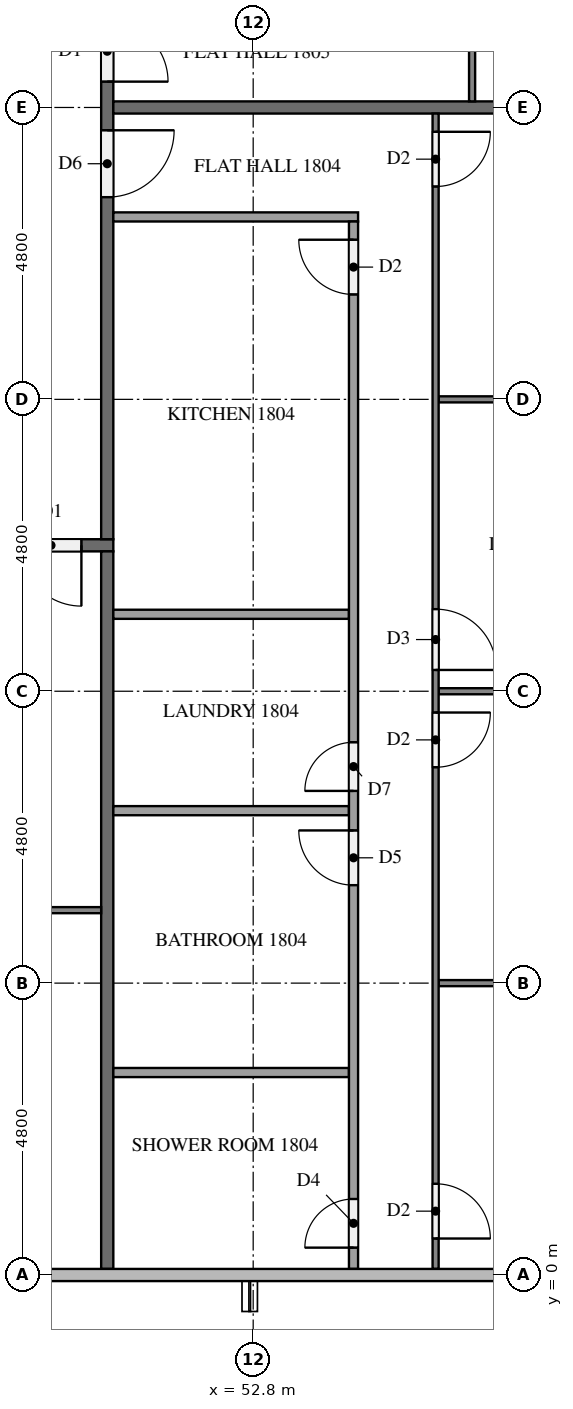
"""IFC4 building model, lengths in metres.
Left out: names, types, materials, properties, quantities, classifications, styles, units other than length and angle.
Written with IfcOpenShell. Run it as: python <this file> out.ifc"""

import sys

from ifc_helpers import new_model, si_unit, direction, frame, frame_2d, origin, place, context, subcontext, project, spatial, rectangle, extrude, element, fill, save


model = new_model("IFC4")
c1 = context("Model", 3, precision=1e-05, world=origin(), true_north=direction((0.0, 1.0)))
c2 = subcontext(c1, "Body", "Model", "MODEL_VIEW")
j1 = project(units=[si_unit("LENGTHUNIT", "METRE"), si_unit("PLANEANGLEUNIT", "RADIAN")], contexts=[c1])
p1 = place(None, origin())
s1 = spatial("IfcSite", under=j1, at=p1, CompositionType="ELEMENT")
p2 = place(p1, origin())
s2 = spatial("IfcBuilding", under=s1, at=p2, CompositionType="ELEMENT")
p3 = place(p2, frame((0.0, 0.0, 73.3)))
s3 = spatial("IfcBuildingStorey", under=s2, at=p3, CompositionType="ELEMENT", Elevation=73.3)
p4 = place(p3, frame((50.5, 12.0, 0.0), z_axis=(0.0, 0.0, 1.0), x_axis=(-1.0, 0.0, 0.0)))
e1 = element("IfcWall", 1, at=p4, inside=s3, PredefinedType="PARTITIONING", context=c2, shape_type="SweptSolid", body=[
    extrude(rectangle(XDim=38.6, YDim=0.2, at=frame_2d((19.3, 0.0))), origin(), (0.0, 0.0, 1.0), 3.2),
])
p5 = place(p4, frame((37.075, 0.0, 0.0)))
e2 = element("IfcOpeningElement", 2, at=p5, cuts=e1, PredefinedType="OPENING", context=c2, shape_type="SweptSolid", body=[
    extrude(rectangle(XDim=1.0, YDim=2.1, at=frame_2d((0.5, 1.05))), frame((0.0, 0.11, 0.0), z_axis=(0.0, -1.0, 0.0), x_axis=(1.0, 0.0, 0.0)), (0.0, 0.0, 1.0), 0.22),
])
p6 = place(p4, frame((22.675, 0.0, 0.0)))
e3 = element("IfcOpeningElement", 3, at=p6, cuts=e1, PredefinedType="OPENING", context=c2, shape_type="SweptSolid", body=[
    extrude(rectangle(XDim=1.0, YDim=2.1, at=frame_2d((0.5, 1.05))), frame((0.0, 0.11, 0.0), z_axis=(0.0, -1.0, 0.0), x_axis=(1.0, 0.0, 0.0)), (0.0, 0.0, 1.0), 0.22),
])
p7 = place(p4, frame((0.525, 0.0, 0.0)))
e4 = element("IfcOpeningElement", 4, at=p7, cuts=e1, PredefinedType="OPENING", context=c2, shape_type="SweptSolid", body=[
    extrude(rectangle(XDim=1.0, YDim=2.1, at=frame_2d((0.5, 1.05))), frame((0.0, 0.11, 0.0), z_axis=(0.0, -1.0, 0.0), x_axis=(1.0, 0.0, 0.0)), (0.0, 0.0, 1.0), 0.22),
])
p8 = place(p3, frame((50.4, 40.7, 0.0), z_axis=(0.0, 0.0, 1.0), x_axis=(0.0, -1.0, 0.0)))
e5 = element("IfcWall", 5, at=p8, inside=s3, PredefinedType="PARTITIONING", context=c2, shape_type="SweptSolid", body=[
    extrude(rectangle(XDim=28.6, YDim=0.2, at=frame_2d((14.3, 0.0))), origin(), (0.0, 0.0, 1.0), 3.2),
])
p9 = place(p8, frame((21.875, 0.0, 0.0)))
e6 = element("IfcOpeningElement", 6, at=p9, cuts=e5, PredefinedType="OPENING", context=c2, shape_type="SweptSolid", body=[
    extrude(rectangle(XDim=1.1, YDim=2.1, at=frame_2d((0.55, 1.05))), frame((0.0, 0.11, 0.0), z_axis=(0.0, -1.0, 0.0), x_axis=(1.0, 0.0, 0.0)), (0.0, 0.0, 1.0), 0.22),
])
p10 = place(p8, frame((20.075, 0.0, 0.0)))
e7 = element("IfcOpeningElement", 7, at=p10, cuts=e5, PredefinedType="OPENING", context=c2, shape_type="SweptSolid", body=[
    extrude(rectangle(XDim=1.0, YDim=2.1, at=frame_2d((0.5, 1.05))), frame((0.0, 0.11, 0.0), z_axis=(0.0, -1.0, 0.0), x_axis=(1.0, 0.0, 0.0)), (0.0, 0.0, 1.0), 0.22),
])
p11 = place(p8, frame((5.675, 0.0, 0.0)))
e8 = element("IfcOpeningElement", 8, at=p11, cuts=e5, PredefinedType="OPENING", context=c2, shape_type="SweptSolid", body=[
    extrude(rectangle(XDim=1.0, YDim=2.1, at=frame_2d((0.5, 1.05))), frame((0.0, 0.11, 0.0), z_axis=(0.0, -1.0, 0.0), x_axis=(1.0, 0.0, 0.0)), (0.0, 0.0, 1.0), 0.22),
])
p12 = place(p3, frame((50.4, 11.9, 0.0), z_axis=(0.0, 0.0, 1.0), x_axis=(0.0, -1.0, 0.0)))
e9 = element("IfcWall", 9, at=p12, inside=s3, PredefinedType="PARTITIONING", context=c2, shape_type="SweptSolid", body=[
    extrude(rectangle(XDim=11.8, YDim=0.2, at=frame_2d((5.9, 0.0))), origin(), (0.0, 0.0, 1.0), 3.2),
])
p13 = place(p3, frame((50.5, 19.2, 0.0), z_axis=(0.0, 0.0, 1.0), x_axis=(1.0, 0.0, 0.0)))
e10 = element("IfcWall", 10, at=p13, inside=s3, PredefinedType="PARTITIONING", context=c2, shape_type="SweptSolid", body=[
    extrude(rectangle(XDim=11.8, YDim=0.2, at=frame_2d((5.9, 0.0))), origin(), (0.0, 0.0, 1.0), 3.2),
])
p14 = place(p3, frame((50.3, 6.0, 0.0), z_axis=(0.0, 0.0, 1.0), x_axis=(-1.0, 0.0, 0.0)))
e11 = element("IfcWall", 11, at=p14, inside=s3, PredefinedType="PARTITIONING", context=c2, shape_type="SweptSolid", body=[
    extrude(rectangle(XDim=11.8, YDim=0.1, at=frame_2d((5.9, 0.0))), origin(), (0.0, 0.0, 1.0), 3.2),
])
p15 = place(p14, frame((5.75, 0.0, 0.0)))
e12 = element("IfcOpeningElement", 12, at=p15, cuts=e11, PredefinedType="OPENING", context=c2, shape_type="SweptSolid", body=[
    extrude(rectangle(XDim=1.0, YDim=2.1, at=frame_2d((0.5, 1.05))), frame((0.0, 0.06, 0.0), z_axis=(0.0, -1.0, 0.0), x_axis=(1.0, 0.0, 0.0)), (0.0, 0.0, 1.0), 0.12),
])
p16 = place(p14, frame((7.45, 0.0, 0.0)))
e13 = element("IfcOpeningElement", 13, at=p16, cuts=e11, PredefinedType="OPENING", context=c2, shape_type="SweptSolid", body=[
    extrude(rectangle(XDim=0.9, YDim=2.1, at=frame_2d((0.45, 1.05))), frame((0.0, 0.06, 0.0), z_axis=(0.0, -1.0, 0.0), x_axis=(1.0, 0.0, 0.0)), (0.0, 0.0, 1.0), 0.12),
])
p17 = place(p3, frame((55.85, 14.4, 0.0), z_axis=(0.0, 0.0, 1.0), x_axis=(1.0, 0.0, 0.0)))
e14 = element("IfcWall", 14, at=p17, inside=s3, PredefinedType="PARTITIONING", context=c2, shape_type="SweptSolid", body=[
    extrude(rectangle(XDim=6.125, YDim=0.1, at=frame_2d((3.062, 0.0))), origin(), (0.0, 0.0, 1.0), 3.2),
])
p18 = place(p3, frame((55.85, 9.6, 0.0), z_axis=(0.0, 0.0, 1.0), x_axis=(1.0, 0.0, 0.0)))
e15 = element("IfcWall", 15, at=p18, inside=s3, PredefinedType="PARTITIONING", context=c2, shape_type="SweptSolid", body=[
    extrude(rectangle(XDim=6.45, YDim=0.1, at=frame_2d((3.225, 0.0))), origin(), (0.0, 0.0, 1.0), 3.2),
])
p19 = place(p3, frame((55.85, 4.8, 0.0), z_axis=(0.0, 0.0, 1.0), x_axis=(1.0, 0.0, 0.0)))
e16 = element("IfcWall", 16, at=p19, inside=s3, PredefinedType="PARTITIONING", context=c2, shape_type="SweptSolid", body=[
    extrude(rectangle(XDim=5.975, YDim=0.1, at=frame_2d((2.987, 0.0))), origin(), (0.0, 0.0, 1.0), 3.2),
])
p20 = place(p3, frame((55.8, 19.1, 0.0), z_axis=(0.0, 0.0, 1.0), x_axis=(0.0, -1.0, 0.0)))
e17 = element("IfcWall", 17, at=p20, inside=s3, PredefinedType="PARTITIONING", context=c2, shape_type="SweptSolid", body=[
    extrude(rectangle(XDim=19.0, YDim=0.1, at=frame_2d((9.5, 0.0))), origin(), (0.0, 0.0, 1.0), 3.2),
])
p21 = place(p20, frame((0.3, 0.0, 0.0)))
e18 = element("IfcOpeningElement", 18, at=p21, cuts=e17, PredefinedType="OPENING", context=c2, shape_type="SweptSolid", body=[
    extrude(rectangle(XDim=0.9, YDim=2.1, at=frame_2d((0.45, 1.05))), frame((0.0, 0.06, 0.0), z_axis=(0.0, -1.0, 0.0), x_axis=(1.0, 0.0, 0.0)), (0.0, 0.0, 1.0), 0.12),
])
p22 = place(p20, frame((8.15, 0.0, 0.0)))
e19 = element("IfcOpeningElement", 19, at=p22, cuts=e17, PredefinedType="OPENING", context=c2, shape_type="SweptSolid", body=[
    extrude(rectangle(XDim=1.0, YDim=2.1, at=frame_2d((0.5, 1.05))), frame((0.0, 0.06, 0.0), z_axis=(0.0, -1.0, 0.0), x_axis=(1.0, 0.0, 0.0)), (0.0, 0.0, 1.0), 0.12),
])
p23 = place(p20, frame((9.85, 0.0, 0.0)))
e20 = element("IfcOpeningElement", 20, at=p23, cuts=e17, PredefinedType="OPENING", context=c2, shape_type="SweptSolid", body=[
    extrude(rectangle(XDim=0.9, YDim=2.1, at=frame_2d((0.45, 1.05))), frame((0.0, 0.06, 0.0), z_axis=(0.0, -1.0, 0.0), x_axis=(1.0, 0.0, 0.0)), (0.0, 0.0, 1.0), 0.12),
])
p24 = place(p20, frame((17.6, 0.0, 0.0)))
e21 = element("IfcOpeningElement", 21, at=p24, cuts=e17, PredefinedType="OPENING", context=c2, shape_type="SweptSolid", body=[
    extrude(rectangle(XDim=0.9, YDim=2.1, at=frame_2d((0.45, 1.05))), frame((0.0, 0.06, 0.0), z_axis=(0.0, -1.0, 0.0), x_axis=(1.0, 0.0, 0.0)), (0.0, 0.0, 1.0), 0.12),
])
for number, where, z_axis, x_axis in (
    (22, (50.5, 10.865, 0.0), (0.0, 0.0, 1.0), (1.0, 0.0, 0.0)),
    (23, (50.5, 7.636, 0.0), (0.0, 0.0, 1.0), (1.0, 0.0, 0.0)),
    (24, (50.5, 3.33, 0.0), (0.0, 0.0, 1.0), (1.0, 0.0, 0.0)),
):
    element("IfcWall", number, at=place(p3, frame(where, z_axis=z_axis, x_axis=x_axis)), inside=s3, PredefinedType="PARTITIONING", context=c2, shape_type="SweptSolid", body=[
        extrude(rectangle(XDim=3.875, YDim=0.15, at=frame_2d((1.938, 0.0))), origin(), (0.0, 0.0, 1.0), 3.2),
    ])
p25 = place(p3, frame((50.5, 17.4, 0.0), z_axis=(0.0, 0.0, 1.0), x_axis=(1.0, 0.0, 0.0)))
e25 = element("IfcWall", 25, at=p25, inside=s3, PredefinedType="PARTITIONING", context=c2, shape_type="SweptSolid", body=[
    extrude(rectangle(XDim=4.025, YDim=0.15, at=frame_2d((2.012, 0.0))), origin(), (0.0, 0.0, 1.0), 3.2),
])
p26 = place(p3, frame((54.45, 0.1, 0.0), z_axis=(0.0, 0.0, 1.0), x_axis=(0.0, 1.0, 0.0)))
e26 = element("IfcWall", 26, at=p26, inside=s3, PredefinedType="PARTITIONING", context=c2, shape_type="SweptSolid", body=[
    extrude(rectangle(XDim=17.225, YDim=0.15, at=frame_2d((8.612, 0.0))), origin(), (0.0, 0.0, 1.0), 3.2),
])
p27 = place(p26, frame((16.025, 0.0, 0.0)))
e27 = element("IfcOpeningElement", 27, at=p27, cuts=e26, PredefinedType="OPENING", context=c2, shape_type="SweptSolid", body=[
    extrude(rectangle(XDim=0.9, YDim=2.1, at=frame_2d((0.45, 1.05))), frame((0.0, 0.085, 0.0), z_axis=(0.0, -1.0, 0.0), x_axis=(1.0, 0.0, 0.0)), (0.0, 0.0, 1.0), 0.17),
])
p28 = place(p26, frame((7.861, 0.0, 0.0)))
e28 = element("IfcOpeningElement", 28, at=p28, cuts=e26, PredefinedType="OPENING", context=c2, shape_type="SweptSolid", body=[
    extrude(rectangle(XDim=0.8, YDim=2.1, at=frame_2d((0.4, 1.05))), frame((0.0, 0.085, 0.0), z_axis=(0.0, -1.0, 0.0), x_axis=(1.0, 0.0, 0.0)), (0.0, 0.0, 1.0), 0.17),
])
p29 = place(p26, frame((6.311, 0.0, 0.0)))
e29 = element("IfcOpeningElement", 29, at=p29, cuts=e26, PredefinedType="OPENING", context=c2, shape_type="SweptSolid", body=[
    extrude(rectangle(XDim=0.9, YDim=2.1, at=frame_2d((0.45, 1.05))), frame((0.0, 0.085, 0.0), z_axis=(0.0, -1.0, 0.0), x_axis=(1.0, 0.0, 0.0)), (0.0, 0.0, 1.0), 0.17),
])
p30 = place(p26, frame((0.35, 0.0, 0.0)))
e30 = element("IfcOpeningElement", 30, at=p30, cuts=e26, PredefinedType="OPENING", context=c2, shape_type="SweptSolid", body=[
    extrude(rectangle(XDim=0.8, YDim=2.1, at=frame_2d((0.4, 1.05))), frame((0.0, 0.085, 0.0), z_axis=(0.0, -1.0, 0.0), x_axis=(1.0, 0.0, 0.0)), (0.0, 0.0, 1.0), 0.17),
])
p31 = place(p3, frame((56.4, 33.5, 0.0), z_axis=(0.0, 0.0, 1.0), x_axis=(0.0, -1.0, 0.0)))
e31 = element("IfcWall", 31, at=p31, inside=s3, PredefinedType="PARTITIONING", context=c2, shape_type="SweptSolid", body=[
    extrude(rectangle(XDim=14.2, YDim=0.1, at=frame_2d((7.1, 0.0))), origin(), (0.0, 0.0, 1.0), 3.2),
])
p32 = place(p31, frame((9.85, 0.0, 0.0)))
e32 = element("IfcOpeningElement", 32, at=p32, cuts=e31, PredefinedType="OPENING", context=c2, shape_type="SweptSolid", body=[
    extrude(rectangle(XDim=0.9, YDim=2.1, at=frame_2d((0.45, 1.05))), frame((0.0, 0.06, 0.0), z_axis=(0.0, -1.0, 0.0), x_axis=(1.0, 0.0, 0.0)), (0.0, 0.0, 1.0), 0.12),
])
p33 = place(p31, frame((8.15, 0.0, 0.0)))
e33 = element("IfcOpeningElement", 33, at=p33, cuts=e31, PredefinedType="OPENING", context=c2, shape_type="SweptSolid", body=[
    extrude(rectangle(XDim=1.0, YDim=2.1, at=frame_2d((0.5, 1.05))), frame((0.0, 0.06, 0.0), z_axis=(0.0, -1.0, 0.0), x_axis=(1.0, 0.0, 0.0)), (0.0, 0.0, 1.0), 0.12),
])
p34 = place(p31, frame((0.3, 0.0, 0.0)))
e34 = element("IfcOpeningElement", 34, at=p34, cuts=e31, PredefinedType="OPENING", context=c2, shape_type="SweptSolid", body=[
    extrude(rectangle(XDim=0.9, YDim=2.1, at=frame_2d((0.45, 1.05))), frame((0.0, 0.06, 0.0), z_axis=(0.0, -1.0, 0.0), x_axis=(1.0, 0.0, 0.0)), (0.0, 0.0, 1.0), 0.12),
])
p35 = place(p7, origin())
e35 = element("IfcDoor", 35, at=p35, inside=s3, OperationType="SINGLE_SWING_LEFT", PredefinedType="DOOR", context=c2, shape_type="SweptSolid", body=[
    extrude(rectangle(XDim=1.0, YDim=2.1, at=frame_2d((0.5, 1.05))), frame((0.0, 0.025, 0.0), z_axis=(0.0, -1.0, 0.0), x_axis=(1.0, 0.0, 0.0)), (0.0, 0.0, 1.0), 0.05),
])
fill(e4, e35)
p36 = place(p9, origin())
e36 = element("IfcDoor", 36, at=p36, inside=s3, OperationType="SINGLE_SWING_LEFT", PredefinedType="DOOR", context=c2, shape_type="SweptSolid", body=[
    extrude(rectangle(XDim=1.1, YDim=2.1, at=frame_2d((0.55, 1.05))), frame((0.0, 0.025, 0.0), z_axis=(0.0, -1.0, 0.0), x_axis=(1.0, 0.0, 0.0)), (0.0, 0.0, 1.0), 0.05),
])
fill(e6, e36)
p37 = place(p10, origin())
e37 = element("IfcDoor", 37, at=p37, inside=s3, OperationType="SINGLE_SWING_RIGHT", PredefinedType="DOOR", context=c2, shape_type="SweptSolid", body=[
    extrude(rectangle(XDim=1.0, YDim=2.1, at=frame_2d((0.5, 1.05))), frame((0.0, 0.025, 0.0), z_axis=(0.0, -1.0, 0.0), x_axis=(1.0, 0.0, 0.0)), (0.0, 0.0, 1.0), 0.05),
])
fill(e7, e37)
p38 = place(p21, origin())
e38 = element("IfcDoor", 38, at=p38, inside=s3, OperationType="SINGLE_SWING_LEFT", PredefinedType="DOOR", context=c2, shape_type="SweptSolid", body=[
    extrude(rectangle(XDim=0.9, YDim=2.1, at=frame_2d((0.45, 1.05))), frame((0.0, 0.025, 0.0), z_axis=(0.0, -1.0, 0.0), x_axis=(1.0, 0.0, 0.0)), (0.0, 0.0, 1.0), 0.05),
])
fill(e18, e38)
p39 = place(p22, origin())
e39 = element("IfcDoor", 39, at=p39, inside=s3, OperationType="SINGLE_SWING_RIGHT", PredefinedType="DOOR", context=c2, shape_type="SweptSolid", body=[
    extrude(rectangle(XDim=1.0, YDim=2.1, at=frame_2d((0.5, 1.05))), frame((0.0, 0.025, 0.0), z_axis=(0.0, -1.0, 0.0), x_axis=(1.0, 0.0, 0.0)), (0.0, 0.0, 1.0), 0.05),
])
fill(e19, e39)
p40 = place(p23, origin())
e40 = element("IfcDoor", 40, at=p40, inside=s3, OperationType="SINGLE_SWING_LEFT", PredefinedType="DOOR", context=c2, shape_type="SweptSolid", body=[
    extrude(rectangle(XDim=0.9, YDim=2.1, at=frame_2d((0.45, 1.05))), frame((0.0, 0.025, 0.0), z_axis=(0.0, -1.0, 0.0), x_axis=(1.0, 0.0, 0.0)), (0.0, 0.0, 1.0), 0.05),
])
fill(e20, e40)
p41 = place(p24, origin())
e41 = element("IfcDoor", 41, at=p41, inside=s3, OperationType="SINGLE_SWING_RIGHT", PredefinedType="DOOR", context=c2, shape_type="SweptSolid", body=[
    extrude(rectangle(XDim=0.9, YDim=2.1, at=frame_2d((0.45, 1.05))), frame((0.0, 0.025, 0.0), z_axis=(0.0, -1.0, 0.0), x_axis=(1.0, 0.0, 0.0)), (0.0, 0.0, 1.0), 0.05),
])
fill(e21, e41)
p42 = place(p27, origin())
e42 = element("IfcDoor", 42, at=p42, inside=s3, OperationType="SINGLE_SWING_RIGHT", PredefinedType="DOOR", context=c2, shape_type="SweptSolid", body=[
    extrude(rectangle(XDim=0.9, YDim=2.1, at=frame_2d((0.45, 1.05))), frame((0.0, 0.025, 0.0), z_axis=(0.0, -1.0, 0.0), x_axis=(1.0, 0.0, 0.0)), (0.0, 0.0, 1.0), 0.05),
])
fill(e27, e42)
p43 = place(p28, origin())
e43 = element("IfcDoor", 43, at=p43, inside=s3, OperationType="SINGLE_SWING_LEFT", PredefinedType="DOOR", context=c2, shape_type="SweptSolid", body=[
    extrude(rectangle(XDim=0.8, YDim=2.1, at=frame_2d((0.4, 1.05))), frame((0.0, 0.025, 0.0), z_axis=(0.0, -1.0, 0.0), x_axis=(1.0, 0.0, 0.0)), (0.0, 0.0, 1.0), 0.05),
])
fill(e28, e43)
p44 = place(p29, origin())
e44 = element("IfcDoor", 44, at=p44, inside=s3, OperationType="SINGLE_SWING_RIGHT", PredefinedType="DOOR", context=c2, shape_type="SweptSolid", body=[
    extrude(rectangle(XDim=0.9, YDim=2.1, at=frame_2d((0.45, 1.05))), frame((0.0, 0.025, 0.0), z_axis=(0.0, -1.0, 0.0), x_axis=(1.0, 0.0, 0.0)), (0.0, 0.0, 1.0), 0.05),
])
fill(e29, e44)
p45 = place(p30, origin())
e45 = element("IfcDoor", 45, at=p45, inside=s3, OperationType="SINGLE_SWING_LEFT", PredefinedType="DOOR", context=c2, shape_type="SweptSolid", body=[
    extrude(rectangle(XDim=0.8, YDim=2.1, at=frame_2d((0.4, 1.05))), frame((0.0, 0.025, 0.0), z_axis=(0.0, -1.0, 0.0), x_axis=(1.0, 0.0, 0.0)), (0.0, 0.0, 1.0), 0.05),
])
fill(e30, e45)
save(model, sys.argv[1])
